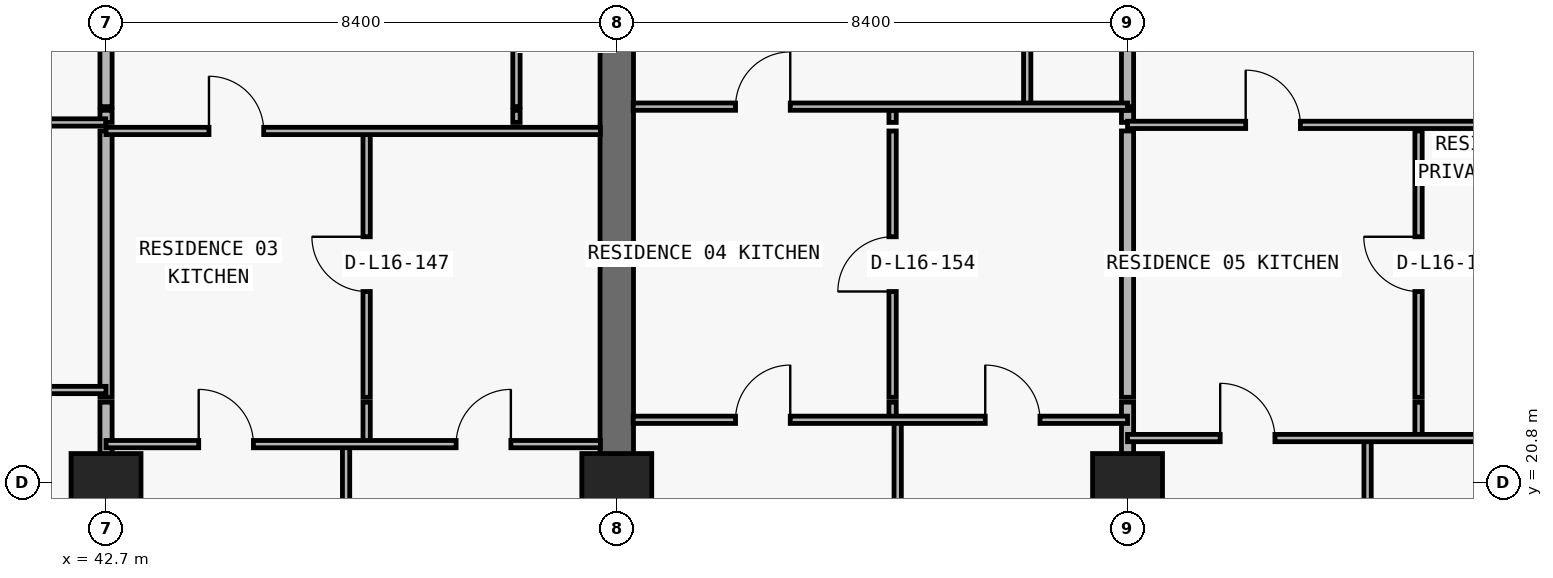
"""IFC4 building model, lengths in metres.
Left out: names, types, materials, properties, quantities, classifications, styles, units other than length and angle.
Written with IfcOpenShell. Run it as: python <this file> out.ifc"""

import sys

from ifc_helpers import new_model, si_unit, direction, frame, frame_2d, origin, origin_2d, place, context, subcontext, project, spatial, rectangle, extrude, element, fill, save


model = new_model("IFC4")
c1 = context("Model", 3, precision=1e-05, world=origin(), true_north=direction((0.0, 1.0)))
c2 = subcontext(c1, "Body", "Model", "MODEL_VIEW")
j1 = project(units=[si_unit("LENGTHUNIT", "METRE"), si_unit("PLANEANGLEUNIT", "RADIAN")], contexts=[c1])
p1 = place(None, origin())
s1 = spatial("IfcSite", under=j1, at=p1, CompositionType="ELEMENT")
p2 = place(p1, origin())
s2 = spatial("IfcBuilding", under=s1, at=p2, CompositionType="ELEMENT")
p3 = place(p2, frame((0.0, 0.0, 63.0)))
s3 = spatial("IfcBuildingStorey", under=s2, at=p3, CompositionType="ELEMENT", Elevation=63.0)
for number, where, z_axis, x_axis in (
    (1, (42.7, 20.8, 0.0), (0.0, 0.0, 1.0), (1.0, 0.0, 0.0)),
    (2, (51.1, 20.8, 0.0), (0.0, 0.0, 1.0), (1.0, 0.0, 0.0)),
    (3, (59.5, 20.8, 0.0), (0.0, 0.0, 1.0), (1.0, 0.0, 0.0)),
):
    element("IfcColumn", number, at=place(p3, frame(where, z_axis=z_axis, x_axis=x_axis)), inside=s3, PredefinedType="COLUMN", context=c2, shape_type="SweptSolid", body=[
        extrude(rectangle(XDim=1.15, YDim=0.95, at=origin_2d()), origin(), (0.0, 0.0, 1.0), 3.05),
    ])
p4 = place(p3, frame((51.1, 20.8, 0.0), z_axis=(0.0, 0.0, 1.0), x_axis=(0.0, 1.0, 0.0)))
e4 = element("IfcWall", 4, at=p4, inside=s3, PredefinedType="SHEAR", context=c2, shape_type="SweptSolid", body=[
    extrude(rectangle(XDim=8.6, YDim=0.55, at=frame_2d((4.3, 0.0))), origin(), (0.0, 0.0, 1.0), 3.05),
])
p5 = place(p3, frame((42.7, 6.24, 0.0), z_axis=(0.0, 0.0, 1.0), x_axis=(0.0, 1.0, 0.0)))
e5 = element("IfcWall", 5, at=p5, inside=s3, PredefinedType="PARTITIONING", context=c2, shape_type="SweptSolid", body=[
    extrude(rectangle(XDim=15.88, YDim=0.2, at=frame_2d((7.94, 0.0))), origin(), (0.0, 0.0, 1.0), 2.11),
])
p6 = place(p3, frame((42.7, 22.2, 0.0), z_axis=(0.0, 0.0, 1.0), x_axis=(0.0, 1.0, 0.0)))
e6 = element("IfcWall", 6, at=p6, inside=s3, PredefinedType="PARTITIONING", context=c2, shape_type="SweptSolid", body=[
    extrude(rectangle(XDim=4.38, YDim=0.2, at=frame_2d((2.19, 0.0))), origin(), (0.0, 0.0, 1.0), 2.11),
])
p7 = place(p3, frame((42.7, 26.72, 0.0), z_axis=(0.0, 0.0, 1.0), x_axis=(0.0, 1.0, 0.0)))
e7 = element("IfcWall", 7, at=p7, inside=s3, PredefinedType="PARTITIONING", context=c2, shape_type="SweptSolid", body=[
    extrude(rectangle(XDim=0.2, YDim=0.2, at=frame_2d((0.1, 0.0))), origin(), (0.0, 0.0, 1.0), 2.11),
])
p8 = place(p3, frame((42.7, 26.98, 0.0), z_axis=(0.0, 0.0, 1.0), x_axis=(0.0, 1.0, 0.0)))
e8 = element("IfcWall", 8, at=p8, inside=s3, PredefinedType="PARTITIONING", context=c2, shape_type="SweptSolid", body=[
    extrude(rectangle(XDim=6.82, YDim=0.2, at=frame_2d((3.41, 0.0))), origin(), (0.0, 0.0, 1.0), 2.11),
])
p9 = place(p3, frame((46.648, 6.24, 0.0), z_axis=(0.0, 0.0, 1.0), x_axis=(0.0, 1.0, 0.0)))
e9 = element("IfcWall", 9, at=p9, inside=s3, PredefinedType="PARTITIONING", context=c2, shape_type="SweptSolid", body=[
    extrude(rectangle(XDim=15.19, YDim=0.12, at=frame_2d((7.595, 0.0))), origin(), (0.0, 0.0, 1.0), 3.05),
])
p10 = place(p3, frame((46.986, 21.43, 0.0), z_axis=(0.0, 0.0, 1.0), x_axis=(0.0, 1.0, 0.0)))
e10 = element("IfcWall", 10, at=p10, inside=s3, PredefinedType="PARTITIONING", context=c2, shape_type="SweptSolid", body=[
    extrude(rectangle(XDim=0.69, YDim=0.12, at=frame_2d((0.345, 0.0))), origin(), (0.0, 0.0, 1.0), 3.05),
])
p11 = place(p3, frame((46.986, 22.2, 0.0), z_axis=(0.0, 0.0, 1.0), x_axis=(0.0, 1.0, 0.0)))
e11 = element("IfcWall", 11, at=p11, inside=s3, PredefinedType="PARTITIONING", context=c2, shape_type="SweptSolid", body=[
    extrude(rectangle(XDim=4.38, YDim=0.12, at=frame_2d((2.19, 0.0))), origin(), (0.0, 0.0, 1.0), 3.05),
])
p12 = place(p11, frame((1.74, 0.0, 0.0)))
e12 = element("IfcOpeningElement", 12, at=p12, cuts=e11, PredefinedType="OPENING", context=c2, shape_type="SweptSolid", body=[
    extrude(rectangle(XDim=0.9, YDim=2.15, at=frame_2d((0.45, 1.075))), frame((0.0, 0.07, 0.0), z_axis=(0.0, -1.0, 0.0), x_axis=(1.0, 0.0, 0.0)), (0.0, 0.0, 1.0), 0.14),
])
p13 = place(p3, frame((49.45, 26.72, 0.0), z_axis=(0.0, 0.0, 1.0), x_axis=(0.0, 1.0, 0.0)))
e13 = element("IfcWall", 13, at=p13, inside=s3, PredefinedType="PARTITIONING", context=c2, shape_type="SweptSolid", body=[
    extrude(rectangle(XDim=0.2, YDim=0.12, at=frame_2d((0.1, 0.0))), origin(), (0.0, 0.0, 1.0), 3.05),
])
p14 = place(p3, frame((49.45, 26.98, 0.0), z_axis=(0.0, 0.0, 1.0), x_axis=(0.0, 1.0, 0.0)))
e14 = element("IfcWall", 14, at=p14, inside=s3, PredefinedType="PARTITIONING", context=c2, shape_type="SweptSolid", body=[
    extrude(rectangle(XDim=6.82, YDim=0.12, at=frame_2d((3.41, 0.0))), origin(), (0.0, 0.0, 1.0), 3.05),
])
p15 = place(p14, frame((3.435, 0.0, 0.0)))
e15 = element("IfcOpeningElement", 15, at=p15, cuts=e14, PredefinedType="OPENING", context=c2, shape_type="SweptSolid", body=[
    extrude(rectangle(XDim=0.85, YDim=2.1, at=frame_2d((0.425, 1.05))), frame((0.0, 0.07, 0.0), z_axis=(0.0, -1.0, 0.0), x_axis=(1.0, 0.0, 0.0)), (0.0, 0.0, 1.0), 0.14),
])
p16 = place(p3, frame((51.1, 6.24, 0.0), z_axis=(0.0, 0.0, 1.0), x_axis=(0.0, 1.0, 0.0)))
e16 = element("IfcWall", 16, at=p16, inside=s3, PredefinedType="PARTITIONING", context=c2, shape_type="SweptSolid", body=[
    extrude(rectangle(XDim=14.555, YDim=0.2, at=frame_2d((7.277, 0.0))), origin(), (0.0, 0.0, 1.0), 2.11),
])
p17 = place(p3, frame((55.636, 21.83, 0.0), z_axis=(0.0, 0.0, 1.0), x_axis=(0.0, 1.0, 0.0)))
e17 = element("IfcWall", 17, at=p17, inside=s3, PredefinedType="PARTITIONING", context=c2, shape_type="SweptSolid", body=[
    extrude(rectangle(XDim=0.29, YDim=0.12, at=frame_2d((0.145, 0.0))), origin(), (0.0, 0.0, 1.0), 3.05),
])
p18 = place(p3, frame((55.636, 22.2, 0.0), z_axis=(0.0, 0.0, 1.0), x_axis=(0.0, 1.0, 0.0)))
e18 = element("IfcWall", 18, at=p18, inside=s3, PredefinedType="PARTITIONING", context=c2, shape_type="SweptSolid", body=[
    extrude(rectangle(XDim=4.38, YDim=0.12, at=frame_2d((2.19, 0.0))), origin(), (0.0, 0.0, 1.0), 3.05),
])
p19 = place(p18, frame((1.74, 0.0, 0.0)))
e19 = element("IfcOpeningElement", 19, at=p19, cuts=e18, PredefinedType="OPENING", context=c2, shape_type="SweptSolid", body=[
    extrude(rectangle(XDim=0.9, YDim=2.15, at=frame_2d((0.45, 1.075))), frame((0.0, 0.07, 0.0), z_axis=(0.0, -1.0, 0.0), x_axis=(1.0, 0.0, 0.0)), (0.0, 0.0, 1.0), 0.14),
])
p20 = place(p3, frame((55.636, 26.72, 0.0), z_axis=(0.0, 0.0, 1.0), x_axis=(0.0, 1.0, 0.0)))
e20 = element("IfcWall", 20, at=p20, inside=s3, PredefinedType="PARTITIONING", context=c2, shape_type="SweptSolid", body=[
    extrude(rectangle(XDim=0.2, YDim=0.12, at=frame_2d((0.1, 0.0))), origin(), (0.0, 0.0, 1.0), 3.05),
])
p21 = place(p3, frame((55.72, 6.24, 0.0), z_axis=(0.0, 0.0, 1.0), x_axis=(0.0, 1.0, 0.0)))
e21 = element("IfcWall", 21, at=p21, inside=s3, PredefinedType="PARTITIONING", context=c2, shape_type="SweptSolid", body=[
    extrude(rectangle(XDim=15.585, YDim=0.12, at=frame_2d((7.792, 0.0))), origin(), (0.0, 0.0, 1.0), 3.05),
])
p22 = place(p3, frame((57.85, 26.98, 0.0), z_axis=(0.0, 0.0, 1.0), x_axis=(0.0, 1.0, 0.0)))
e22 = element("IfcWall", 22, at=p22, inside=s3, PredefinedType="PARTITIONING", context=c2, shape_type="SweptSolid", body=[
    extrude(rectangle(XDim=6.82, YDim=0.12, at=frame_2d((3.41, 0.0))), origin(), (0.0, 0.0, 1.0), 3.05),
])
p23 = place(p22, frame((3.435, 0.0, 0.0)))
e23 = element("IfcOpeningElement", 23, at=p23, cuts=e22, PredefinedType="OPENING", context=c2, shape_type="SweptSolid", body=[
    extrude(rectangle(XDim=0.85, YDim=2.1, at=frame_2d((0.425, 1.05))), frame((0.0, 0.07, 0.0), z_axis=(0.0, -1.0, 0.0), x_axis=(1.0, 0.0, 0.0)), (0.0, 0.0, 1.0), 0.14),
])
p24 = place(p3, frame((59.5, 6.24, 0.0), z_axis=(0.0, 0.0, 1.0), x_axis=(0.0, 1.0, 0.0)))
e24 = element("IfcWall", 24, at=p24, inside=s3, PredefinedType="PARTITIONING", context=c2, shape_type="SweptSolid", body=[
    extrude(rectangle(XDim=15.88, YDim=0.2, at=frame_2d((7.94, 0.0))), origin(), (0.0, 0.0, 1.0), 2.11),
])
p25 = place(p3, frame((59.5, 22.2, 0.0), z_axis=(0.0, 0.0, 1.0), x_axis=(0.0, 1.0, 0.0)))
e25 = element("IfcWall", 25, at=p25, inside=s3, PredefinedType="PARTITIONING", context=c2, shape_type="SweptSolid", body=[
    extrude(rectangle(XDim=4.38, YDim=0.2, at=frame_2d((2.19, 0.0))), origin(), (0.0, 0.0, 1.0), 2.11),
])
p26 = place(p3, frame((59.5, 26.72, 0.0), z_axis=(0.0, 0.0, 1.0), x_axis=(0.0, 1.0, 0.0)))
e26 = element("IfcWall", 26, at=p26, inside=s3, PredefinedType="PARTITIONING", context=c2, shape_type="SweptSolid", body=[
    extrude(rectangle(XDim=0.2, YDim=0.2, at=frame_2d((0.1, 0.0))), origin(), (0.0, 0.0, 1.0), 2.11),
])
p27 = place(p3, frame((59.5, 26.98, 0.0), z_axis=(0.0, 0.0, 1.0), x_axis=(0.0, 1.0, 0.0)))
e27 = element("IfcWall", 27, at=p27, inside=s3, PredefinedType="PARTITIONING", context=c2, shape_type="SweptSolid", body=[
    extrude(rectangle(XDim=6.82, YDim=0.2, at=frame_2d((3.41, 0.0))), origin(), (0.0, 0.0, 1.0), 2.11),
])
p28 = place(p3, frame((63.448, 6.24, 0.0), z_axis=(0.0, 0.0, 1.0), x_axis=(0.0, 1.0, 0.0)))
e28 = element("IfcWall", 28, at=p28, inside=s3, PredefinedType="PARTITIONING", context=c2, shape_type="SweptSolid", body=[
    extrude(rectangle(XDim=15.29, YDim=0.12, at=frame_2d((7.645, 0.0))), origin(), (0.0, 0.0, 1.0), 3.05),
])
p29 = place(p3, frame((64.286, 21.53, 0.0), z_axis=(0.0, 0.0, 1.0), x_axis=(0.0, 1.0, 0.0)))
e29 = element("IfcWall", 29, at=p29, inside=s3, PredefinedType="PARTITIONING", context=c2, shape_type="SweptSolid", body=[
    extrude(rectangle(XDim=0.59, YDim=0.12, at=frame_2d((0.295, 0.0))), origin(), (0.0, 0.0, 1.0), 3.05),
])
p30 = place(p3, frame((64.286, 22.2, 0.0), z_axis=(0.0, 0.0, 1.0), x_axis=(0.0, 1.0, 0.0)))
e30 = element("IfcWall", 30, at=p30, inside=s3, PredefinedType="PARTITIONING", context=c2, shape_type="SweptSolid", body=[
    extrude(rectangle(XDim=4.38, YDim=0.12, at=frame_2d((2.19, 0.0))), origin(), (0.0, 0.0, 1.0), 3.05),
])
p31 = place(p30, frame((1.74, 0.0, 0.0)))
e31 = element("IfcOpeningElement", 31, at=p31, cuts=e30, PredefinedType="OPENING", context=c2, shape_type="SweptSolid", body=[
    extrude(rectangle(XDim=0.9, YDim=2.15, at=frame_2d((0.45, 1.075))), frame((0.0, 0.07, 0.0), z_axis=(0.0, -1.0, 0.0), x_axis=(1.0, 0.0, 0.0)), (0.0, 0.0, 1.0), 0.14),
])
p32 = place(p3, frame((42.7, 21.43, 0.0), z_axis=(0.0, 0.0, 1.0), x_axis=(1.0, 0.0, 0.0)))
e32 = element("IfcWall", 32, at=p32, inside=s3, PredefinedType="PARTITIONING", context=c2, shape_type="SweptSolid", body=[
    extrude(rectangle(XDim=8.13, YDim=0.12, at=frame_2d((4.065, 0.0))), origin(), (0.0, 0.0, 1.0), 3.05),
])
p33 = place(p32, frame((1.524, 0.0, 0.0)))
e33 = element("IfcOpeningElement", 33, at=p33, cuts=e32, PredefinedType="OPENING", context=c2, shape_type="SweptSolid", body=[
    extrude(rectangle(XDim=0.9, YDim=2.15, at=frame_2d((0.45, 1.075))), frame((0.0, 0.07, 0.0), z_axis=(0.0, -1.0, 0.0), x_axis=(1.0, 0.0, 0.0)), (0.0, 0.0, 1.0), 0.14),
])
p34 = place(p32, frame((5.758, 0.0, 0.0)))
e34 = element("IfcOpeningElement", 34, at=p34, cuts=e32, PredefinedType="OPENING", context=c2, shape_type="SweptSolid", body=[
    extrude(rectangle(XDim=0.9, YDim=2.15, at=frame_2d((0.45, 1.075))), frame((0.0, 0.07, 0.0), z_axis=(0.0, -1.0, 0.0), x_axis=(1.0, 0.0, 0.0)), (0.0, 0.0, 1.0), 0.14),
])
p35 = place(p3, frame((59.5, 21.53, 0.0), z_axis=(0.0, 0.0, 1.0), x_axis=(1.0, 0.0, 0.0)))
e35 = element("IfcWall", 35, at=p35, inside=s3, PredefinedType="PARTITIONING", context=c2, shape_type="SweptSolid", body=[
    extrude(rectangle(XDim=8.4, YDim=0.12, at=frame_2d((4.2, 0.0))), origin(), (0.0, 0.0, 1.0), 3.05),
])
p36 = place(p35, frame((1.524, 0.0, 0.0)))
e36 = element("IfcOpeningElement", 36, at=p36, cuts=e35, PredefinedType="OPENING", context=c2, shape_type="SweptSolid", body=[
    extrude(rectangle(XDim=0.9, YDim=2.15, at=frame_2d((0.45, 1.075))), frame((0.0, 0.07, 0.0), z_axis=(0.0, -1.0, 0.0), x_axis=(1.0, 0.0, 0.0)), (0.0, 0.0, 1.0), 0.14),
])
p37 = place(p35, frame((6.143, 0.0, 0.0)))
e37 = element("IfcOpeningElement", 37, at=p37, cuts=e35, PredefinedType="OPENING", context=c2, shape_type="SweptSolid", body=[
    extrude(rectangle(XDim=0.9, YDim=2.15, at=frame_2d((0.45, 1.075))), frame((0.0, 0.07, 0.0), z_axis=(0.0, -1.0, 0.0), x_axis=(1.0, 0.0, 0.0)), (0.0, 0.0, 1.0), 0.14),
])
p38 = place(p3, frame((51.37, 21.83, 0.0), z_axis=(0.0, 0.0, 1.0), x_axis=(1.0, 0.0, 0.0)))
e38 = element("IfcWall", 38, at=p38, inside=s3, PredefinedType="PARTITIONING", context=c2, shape_type="SweptSolid", body=[
    extrude(rectangle(XDim=8.13, YDim=0.12, at=frame_2d((4.065, 0.0))), origin(), (0.0, 0.0, 1.0), 3.05),
])
p39 = place(p38, frame((1.683, 0.0, 0.0)))
e39 = element("IfcOpeningElement", 39, at=p39, cuts=e38, PredefinedType="OPENING", context=c2, shape_type="SweptSolid", body=[
    extrude(rectangle(XDim=0.9, YDim=2.15, at=frame_2d((0.45, 1.075))), frame((0.0, 0.07, 0.0), z_axis=(0.0, -1.0, 0.0), x_axis=(1.0, 0.0, 0.0)), (0.0, 0.0, 1.0), 0.14),
])
p40 = place(p38, frame((5.79, 0.0, 0.0)))
e40 = element("IfcOpeningElement", 40, at=p40, cuts=e38, PredefinedType="OPENING", context=c2, shape_type="SweptSolid", body=[
    extrude(rectangle(XDim=0.9, YDim=2.15, at=frame_2d((0.45, 1.075))), frame((0.0, 0.07, 0.0), z_axis=(0.0, -1.0, 0.0), x_axis=(1.0, 0.0, 0.0)), (0.0, 0.0, 1.0), 0.14),
])
p41 = place(p3, frame((35.105, 22.32, 0.0), z_axis=(0.0, 0.0, 1.0), x_axis=(1.0, 0.0, 0.0)))
e41 = element("IfcWall", 41, at=p41, inside=s3, PredefinedType="PARTITIONING", context=c2, shape_type="SweptSolid", body=[
    extrude(rectangle(XDim=7.595, YDim=0.12, at=frame_2d((3.797, 0.0))), origin(), (0.0, 0.0, 1.0), 3.05),
])
p42 = place(p41, frame((3.347, 0.0, 0.0)))
e42 = element("IfcOpeningElement", 42, at=p42, cuts=e41, PredefinedType="OPENING", context=c2, shape_type="SweptSolid", body=[
    extrude(rectangle(XDim=0.9, YDim=2.15, at=frame_2d((0.45, 1.075))), frame((0.0, 0.07, 0.0), z_axis=(0.0, -1.0, 0.0), x_axis=(1.0, 0.0, 0.0)), (0.0, 0.0, 1.0), 0.14),
])
p43 = place(p3, frame((42.7, 26.58, 0.0), z_axis=(0.0, 0.0, 1.0), x_axis=(1.0, 0.0, 0.0)))
e43 = element("IfcWall", 43, at=p43, inside=s3, PredefinedType="PARTITIONING", context=c2, shape_type="SweptSolid", body=[
    extrude(rectangle(XDim=8.13, YDim=0.12, at=frame_2d((4.065, 0.0))), origin(), (0.0, 0.0, 1.0), 3.05),
])
p44 = place(p43, frame((1.693, 0.0, 0.0)))
e44 = element("IfcOpeningElement", 44, at=p44, cuts=e43, PredefinedType="OPENING", context=c2, shape_type="SweptSolid", body=[
    extrude(rectangle(XDim=0.9, YDim=2.15, at=frame_2d((0.45, 1.075))), frame((0.0, 0.07, 0.0), z_axis=(0.0, -1.0, 0.0), x_axis=(1.0, 0.0, 0.0)), (0.0, 0.0, 1.0), 0.14),
])
p45 = place(p3, frame((59.5, 26.68, 0.0), z_axis=(0.0, 0.0, 1.0), x_axis=(1.0, 0.0, 0.0)))
e45 = element("IfcWall", 45, at=p45, inside=s3, PredefinedType="PARTITIONING", context=c2, shape_type="SweptSolid", body=[
    extrude(rectangle(XDim=8.4, YDim=0.12, at=frame_2d((4.2, 0.0))), origin(), (0.0, 0.0, 1.0), 3.05),
])
p46 = place(p45, frame((1.943, 0.0, 0.0)))
e46 = element("IfcOpeningElement", 46, at=p46, cuts=e45, PredefinedType="OPENING", context=c2, shape_type="SweptSolid", body=[
    extrude(rectangle(XDim=0.9, YDim=2.15, at=frame_2d((0.45, 1.075))), frame((0.0, 0.07, 0.0), z_axis=(0.0, -1.0, 0.0), x_axis=(1.0, 0.0, 0.0)), (0.0, 0.0, 1.0), 0.14),
])
p47 = place(p3, frame((35.1, 26.72, 0.0), z_axis=(0.0, 0.0, 1.0), x_axis=(1.0, 0.0, 0.0)))
e47 = element("IfcWall", 47, at=p47, inside=s3, PredefinedType="PARTITIONING", context=c2, shape_type="SweptSolid", body=[
    extrude(rectangle(XDim=7.595, YDim=0.12, at=frame_2d((3.797, 0.0))), origin(), (0.0, 0.0, 1.0), 3.05),
])
p48 = place(p47, frame((2.6, 0.0, 0.0)))
e48 = element("IfcOpeningElement", 48, at=p48, cuts=e47, PredefinedType="OPENING", context=c2, shape_type="SweptSolid", body=[
    extrude(rectangle(XDim=0.9, YDim=2.15, at=frame_2d((0.45, 1.075))), frame((0.0, 0.07, 0.0), z_axis=(0.0, -1.0, 0.0), x_axis=(1.0, 0.0, 0.0)), (0.0, 0.0, 1.0), 0.14),
])
p49 = place(p3, frame((51.37, 26.98, 0.0), z_axis=(0.0, 0.0, 1.0), x_axis=(1.0, 0.0, 0.0)))
e49 = element("IfcWall", 49, at=p49, inside=s3, PredefinedType="PARTITIONING", context=c2, shape_type="SweptSolid", body=[
    extrude(rectangle(XDim=8.13, YDim=0.12, at=frame_2d((4.065, 0.0))), origin(), (0.0, 0.0, 1.0), 3.05),
])
p50 = place(p49, frame((1.683, 0.0, 0.0)))
e50 = element("IfcOpeningElement", 50, at=p50, cuts=e49, PredefinedType="OPENING", context=c2, shape_type="SweptSolid", body=[
    extrude(rectangle(XDim=0.9, YDim=2.15, at=frame_2d((0.45, 1.075))), frame((0.0, 0.07, 0.0), z_axis=(0.0, -1.0, 0.0), x_axis=(1.0, 0.0, 0.0)), (0.0, 0.0, 1.0), 0.14),
])
p51 = place(p44, origin())
e51 = element("IfcDoor", 51, at=p51, inside=s3, OperationType="SINGLE_SWING_LEFT", PredefinedType="DOOR", context=c2, shape_type="SweptSolid", body=[
    extrude(rectangle(XDim=0.9, YDim=2.15, at=frame_2d((0.45, 1.075))), frame((0.0, 0.025, 0.0), z_axis=(0.0, -1.0, 0.0), x_axis=(1.0, 0.0, 0.0)), (0.0, 0.0, 1.0), 0.05),
])
fill(e44, e51)
p52 = place(p12, origin())
e52 = element("IfcDoor", 52, at=p52, inside=s3, OperationType="SINGLE_SWING_RIGHT", PredefinedType="DOOR", context=c2, shape_type="SweptSolid", body=[
    extrude(rectangle(XDim=0.9, YDim=2.15, at=frame_2d((0.45, 1.075))), frame((0.0, 0.025, 0.0), z_axis=(0.0, -1.0, 0.0), x_axis=(1.0, 0.0, 0.0)), (0.0, 0.0, 1.0), 0.05),
])
fill(e12, e52)
p53 = place(p33, origin())
e53 = element("IfcDoor", 53, at=p53, inside=s3, OperationType="SINGLE_SWING_LEFT", PredefinedType="DOOR", context=c2, shape_type="SweptSolid", body=[
    extrude(rectangle(XDim=0.9, YDim=2.15, at=frame_2d((0.45, 1.075))), frame((0.0, 0.025, 0.0), z_axis=(0.0, -1.0, 0.0), x_axis=(1.0, 0.0, 0.0)), (0.0, 0.0, 1.0), 0.05),
])
fill(e33, e53)
p54 = place(p34, origin())
e54 = element("IfcDoor", 54, at=p54, inside=s3, OperationType="SINGLE_SWING_RIGHT", PredefinedType="DOOR", context=c2, shape_type="SweptSolid", body=[
    extrude(rectangle(XDim=0.9, YDim=2.15, at=frame_2d((0.45, 1.075))), frame((0.0, 0.025, 0.0), z_axis=(0.0, -1.0, 0.0), x_axis=(1.0, 0.0, 0.0)), (0.0, 0.0, 1.0), 0.05),
])
fill(e34, e54)
p55 = place(p50, origin())
e55 = element("IfcDoor", 55, at=p55, inside=s3, OperationType="SINGLE_SWING_RIGHT", PredefinedType="DOOR", context=c2, shape_type="SweptSolid", body=[
    extrude(rectangle(XDim=0.9, YDim=2.15, at=frame_2d((0.45, 1.075))), frame((0.0, 0.025, 0.0), z_axis=(0.0, -1.0, 0.0), x_axis=(1.0, 0.0, 0.0)), (0.0, 0.0, 1.0), 0.05),
])
fill(e50, e55)
p56 = place(p19, origin())
e56 = element("IfcDoor", 56, at=p56, inside=s3, OperationType="SINGLE_SWING_LEFT", PredefinedType="DOOR", context=c2, shape_type="SweptSolid", body=[
    extrude(rectangle(XDim=0.9, YDim=2.15, at=frame_2d((0.45, 1.075))), frame((0.0, 0.025, 0.0), z_axis=(0.0, -1.0, 0.0), x_axis=(1.0, 0.0, 0.0)), (0.0, 0.0, 1.0), 0.05),
])
fill(e19, e56)
p57 = place(p39, origin())
e57 = element("IfcDoor", 57, at=p57, inside=s3, OperationType="SINGLE_SWING_RIGHT", PredefinedType="DOOR", context=c2, shape_type="SweptSolid", body=[
    extrude(rectangle(XDim=0.9, YDim=2.15, at=frame_2d((0.45, 1.075))), frame((0.0, 0.025, 0.0), z_axis=(0.0, -1.0, 0.0), x_axis=(1.0, 0.0, 0.0)), (0.0, 0.0, 1.0), 0.05),
])
fill(e39, e57)
p58 = place(p40, origin())
e58 = element("IfcDoor", 58, at=p58, inside=s3, OperationType="SINGLE_SWING_LEFT", PredefinedType="DOOR", context=c2, shape_type="SweptSolid", body=[
    extrude(rectangle(XDim=0.9, YDim=2.15, at=frame_2d((0.45, 1.075))), frame((0.0, 0.025, 0.0), z_axis=(0.0, -1.0, 0.0), x_axis=(1.0, 0.0, 0.0)), (0.0, 0.0, 1.0), 0.05),
])
fill(e40, e58)
p59 = place(p46, origin())
e59 = element("IfcDoor", 59, at=p59, inside=s3, OperationType="SINGLE_SWING_LEFT", PredefinedType="DOOR", context=c2, shape_type="SweptSolid", body=[
    extrude(rectangle(XDim=0.9, YDim=2.15, at=frame_2d((0.45, 1.075))), frame((0.0, 0.025, 0.0), z_axis=(0.0, -1.0, 0.0), x_axis=(1.0, 0.0, 0.0)), (0.0, 0.0, 1.0), 0.05),
])
fill(e46, e59)
p60 = place(p31, origin())
e60 = element("IfcDoor", 60, at=p60, inside=s3, OperationType="SINGLE_SWING_RIGHT", PredefinedType="DOOR", context=c2, shape_type="SweptSolid", body=[
    extrude(rectangle(XDim=0.9, YDim=2.15, at=frame_2d((0.45, 1.075))), frame((0.0, 0.025, 0.0), z_axis=(0.0, -1.0, 0.0), x_axis=(1.0, 0.0, 0.0)), (0.0, 0.0, 1.0), 0.05),
])
fill(e31, e60)
p61 = place(p36, origin())
e61 = element("IfcDoor", 61, at=p61, inside=s3, OperationType="SINGLE_SWING_LEFT", PredefinedType="DOOR", context=c2, shape_type="SweptSolid", body=[
    extrude(rectangle(XDim=0.9, YDim=2.15, at=frame_2d((0.45, 1.075))), frame((0.0, 0.025, 0.0), z_axis=(0.0, -1.0, 0.0), x_axis=(1.0, 0.0, 0.0)), (0.0, 0.0, 1.0), 0.05),
])
fill(e36, e61)
save(model, sys.argv[1])
